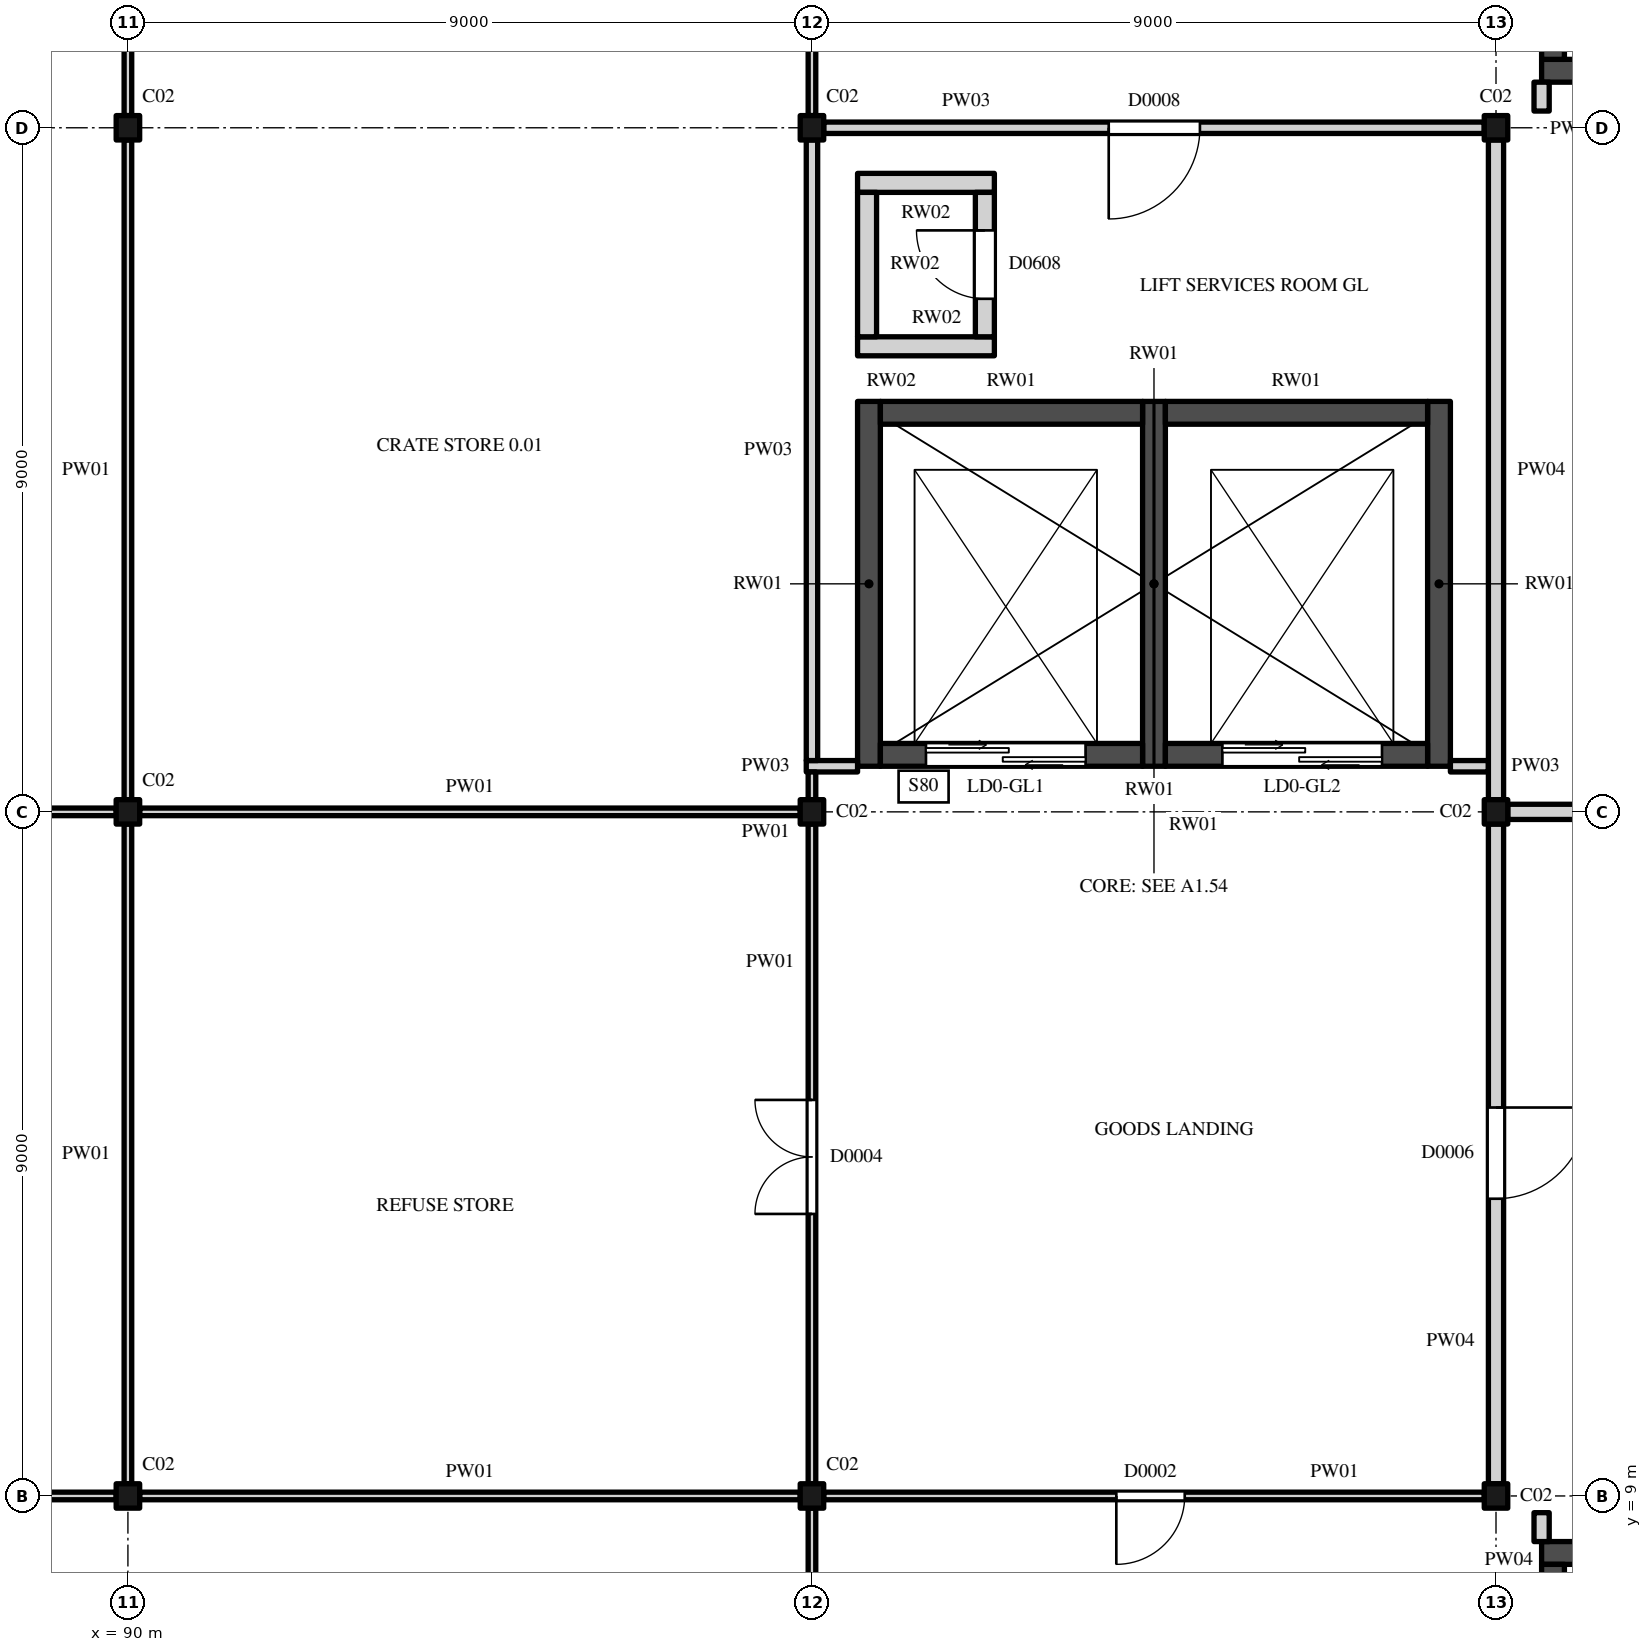
"""IFC4 building model, lengths in metres.
Left out: names, types, materials, properties, quantities, classifications, styles, units other than length and angle.
Written with IfcOpenShell. Run it as: python <this file> out.ifc"""

import sys

from ifc_helpers import new_model, si_unit, direction, frame, frame_2d, origin, origin_2d, place, context, subcontext, project, spatial, rectangle, i_section, extrude, element, fill, save


model = new_model("IFC4")
c1 = context("Model", 3, precision=1e-05, world=origin(), true_north=direction((0.0, 1.0)))
c2 = subcontext(c1, "Body", "Model", "MODEL_VIEW")
j1 = project(units=[si_unit("LENGTHUNIT", "METRE"), si_unit("PLANEANGLEUNIT", "RADIAN")], contexts=[c1])
p1 = place(None, origin())
s1 = spatial("IfcSite", under=j1, at=p1, CompositionType="ELEMENT")
p2 = place(p1, origin())
s2 = spatial("IfcBuilding", under=s1, at=p2, CompositionType="ELEMENT")
p3 = place(p2, origin())
s3 = spatial("IfcBuildingStorey", under=s2, at=p3, CompositionType="ELEMENT", Elevation=0.0)
for number, where, z_axis, x_axis in (
    (1, (90.0, 9.0, 0.0), (0.0, 0.0, 1.0), (1.0, 0.0, 0.0)),
    (2, (99.0, 9.0, 0.0), (0.0, 0.0, 1.0), (1.0, 0.0, 0.0)),
    (3, (108.0, 9.0, 0.0), (0.0, 0.0, 1.0), (1.0, 0.0, 0.0)),
    (4, (90.0, 18.0, 0.0), (0.0, 0.0, 1.0), (1.0, 0.0, 0.0)),
    (5, (99.0, 18.0, 0.0), (0.0, 0.0, 1.0), (1.0, 0.0, 0.0)),
    (6, (108.0, 18.0, 0.0), (0.0, 0.0, 1.0), (1.0, 0.0, 0.0)),
    (7, (90.0, 27.0, 0.0), (0.0, 0.0, 1.0), (1.0, 0.0, 0.0)),
    (8, (99.0, 27.0, 0.0), (0.0, 0.0, 1.0), (1.0, 0.0, 0.0)),
    (9, (108.0, 27.0, 0.0), (0.0, 0.0, 1.0), (1.0, 0.0, 0.0)),
):
    element("IfcColumn", number, at=place(p3, frame(where, z_axis=z_axis, x_axis=x_axis)), inside=s3, PredefinedType="COLUMN", context=c2, shape_type="SweptSolid", body=[
        extrude(i_section(OverallWidth=0.309, OverallDepth=0.321, WebThickness=0.014, FlangeThickness=0.022, FilletRadius=0.017, at=origin_2d()), origin(), (0.0, 0.0, 1.0), 6.0),
    ])
p4 = place(p3, frame((108.6, 8.25, 0.0), z_axis=(0.0, 0.0, 1.0), x_axis=(1.0, 0.0, 0.0)))
e10 = element("IfcWall", 10, at=p4, inside=s3, PredefinedType="SHEAR", context=c2, shape_type="SweptSolid", body=[
    extrude(rectangle(XDim=8.1, YDim=0.3, at=frame_2d((4.05, 0.0))), origin(), (0.0, 0.0, 1.0), 6.0),
])
p5 = place(p3, frame((108.75, 0.3, 0.0), z_axis=(0.0, 0.0, 1.0), x_axis=(0.0, 1.0, 0.0)))
e11 = element("IfcWall", 11, at=p5, inside=s3, PredefinedType="SHEAR", context=c2, shape_type="SweptSolid", body=[
    extrude(rectangle(XDim=7.8, YDim=0.3, at=frame_2d((3.9, 0.0))), origin(), (0.0, 0.0, 1.0), 6.0),
])
p6 = place(p5, frame((3.6, 0.0, 0.0)))
e12 = element("IfcOpeningElement", 12, at=p6, cuts=e11, PredefinedType="OPENING", context=c2, shape_type="SweptSolid", body=[
    extrude(rectangle(XDim=1.2, YDim=2.1, at=frame_2d((0.6, 1.05))), frame((0.0, 0.16, 0.0), z_axis=(0.0, -1.0, 0.0), x_axis=(1.0, 0.0, 0.0)), (0.0, 0.0, 1.0), 0.32),
])
p7 = place(p3, frame((108.6, 27.75, 0.0), z_axis=(0.0, 0.0, 1.0), x_axis=(1.0, 0.0, 0.0)))
e13 = element("IfcWall", 13, at=p7, inside=s3, PredefinedType="SHEAR", context=c2, shape_type="SweptSolid", body=[
    extrude(rectangle(XDim=8.1, YDim=0.3, at=frame_2d((4.05, 0.0))), origin(), (0.0, 0.0, 1.0), 6.0),
])
p8 = place(p3, frame((108.75, 27.9, 0.0), z_axis=(0.0, 0.0, 1.0), x_axis=(0.0, 1.0, 0.0)))
e14 = element("IfcWall", 14, at=p8, inside=s3, PredefinedType="SHEAR", context=c2, shape_type="SweptSolid", body=[
    extrude(rectangle(XDim=7.2, YDim=0.3, at=frame_2d((3.6, 0.0))), origin(), (0.0, 0.0, 1.0), 6.0),
])
p9 = place(p8, frame((3.0, 0.0, 0.0)))
e15 = element("IfcOpeningElement", 15, at=p9, cuts=e14, PredefinedType="OPENING", context=c2, shape_type="SweptSolid", body=[
    extrude(rectangle(XDim=1.2, YDim=2.1, at=frame_2d((0.6, 1.05))), frame((0.0, 0.16, 0.0), z_axis=(0.0, -1.0, 0.0), x_axis=(1.0, 0.0, 0.0)), (0.0, 0.0, 1.0), 0.32),
])
for number, where, z_axis, x_axis in (
    (16, (99.75, 18.6, -1.5), (0.0, 0.0, 1.0), (0.0, 1.0, 0.0)),
    (17, (103.5, 18.6, -1.5), (0.0, 0.0, 1.0), (0.0, 1.0, 0.0)),
    (18, (107.25, 18.6, -1.5), (0.0, 0.0, 1.0), (0.0, 1.0, 0.0)),
):
    element("IfcWall", number, at=place(p3, frame(where, z_axis=z_axis, x_axis=x_axis)), inside=s3, PredefinedType="SHEAR", context=c2, shape_type="SweptSolid", body=[
        extrude(rectangle(XDim=4.8, YDim=0.3, at=frame_2d((2.4, 0.0))), origin(), (0.0, 0.0, 1.0), 7.5),
    ])
p10 = place(p3, frame((99.9, 18.75, -1.5), z_axis=(0.0, 0.0, 1.0), x_axis=(1.0, 0.0, 0.0)))
e19 = element("IfcWall", 19, at=p10, inside=s3, PredefinedType="SHEAR", context=c2, shape_type="SweptSolid", body=[
    extrude(rectangle(XDim=3.45, YDim=0.3, at=frame_2d((1.725, 0.0))), origin(), (0.0, 0.0, 1.0), 7.5),
])
p11 = place(p10, frame((0.6, 0.0, 1.5)))
e20 = element("IfcOpeningElement", 20, at=p11, cuts=e19, PredefinedType="OPENING", context=c2, shape_type="SweptSolid", body=[
    extrude(rectangle(XDim=2.1, YDim=2.4, at=frame_2d((1.05, 1.2))), frame((0.0, 0.16, 0.0), z_axis=(0.0, -1.0, 0.0), x_axis=(1.0, 0.0, 0.0)), (0.0, 0.0, 1.0), 0.32),
])
p12 = place(p3, frame((99.9, 23.25, -1.5), z_axis=(0.0, 0.0, 1.0), x_axis=(1.0, 0.0, 0.0)))
e21 = element("IfcWall", 21, at=p12, inside=s3, PredefinedType="SHEAR", context=c2, shape_type="SweptSolid", body=[
    extrude(rectangle(XDim=3.45, YDim=0.3, at=frame_2d((1.725, 0.0))), origin(), (0.0, 0.0, 1.0), 7.5),
])
p13 = place(p3, frame((103.65, 18.75, -1.5), z_axis=(0.0, 0.0, 1.0), x_axis=(1.0, 0.0, 0.0)))
e22 = element("IfcWall", 22, at=p13, inside=s3, PredefinedType="SHEAR", context=c2, shape_type="SweptSolid", body=[
    extrude(rectangle(XDim=3.45, YDim=0.3, at=frame_2d((1.725, 0.0))), origin(), (0.0, 0.0, 1.0), 7.5),
])
p14 = place(p13, frame((0.75, 0.0, 1.5)))
e23 = element("IfcOpeningElement", 23, at=p14, cuts=e22, PredefinedType="OPENING", context=c2, shape_type="SweptSolid", body=[
    extrude(rectangle(XDim=2.1, YDim=2.4, at=frame_2d((1.05, 1.2))), frame((0.0, 0.16, 0.0), z_axis=(0.0, -1.0, 0.0), x_axis=(1.0, 0.0, 0.0)), (0.0, 0.0, 1.0), 0.32),
])
p15 = place(p3, frame((103.65, 23.25, -1.5), z_axis=(0.0, 0.0, 1.0), x_axis=(1.0, 0.0, 0.0)))
e24 = element("IfcWall", 24, at=p15, inside=s3, PredefinedType="SHEAR", context=c2, shape_type="SweptSolid", body=[
    extrude(rectangle(XDim=3.45, YDim=0.3, at=frame_2d((1.725, 0.0))), origin(), (0.0, 0.0, 1.0), 7.5),
])
for number, where, z_axis, x_axis in (
    (25, (99.6, 24.125, 0.0), (0.0, 0.0, 1.0), (1.0, 0.0, 0.0)),
    (26, (99.6, 26.275, 0.0), (0.0, 0.0, 1.0), (1.0, 0.0, 0.0)),
):
    element("IfcWall", number, at=place(p3, frame(where, z_axis=z_axis, x_axis=x_axis)), inside=s3, PredefinedType="STANDARD", context=c2, shape_type="SweptSolid", body=[
        extrude(rectangle(XDim=1.8, YDim=0.25, at=frame_2d((0.9, 0.0))), origin(), (0.0, 0.0, 1.0), 6.0),
    ])
p16 = place(p3, frame((99.725, 24.25, 0.0), z_axis=(0.0, 0.0, 1.0), x_axis=(0.0, 1.0, 0.0)))
e27 = element("IfcWall", 27, at=p16, inside=s3, PredefinedType="STANDARD", context=c2, shape_type="SweptSolid", body=[
    extrude(rectangle(XDim=1.9, YDim=0.25, at=frame_2d((0.95, 0.0))), origin(), (0.0, 0.0, 1.0), 6.0),
])
p17 = place(p3, frame((101.275, 24.25, 0.0), z_axis=(0.0, 0.0, 1.0), x_axis=(0.0, 1.0, 0.0)))
e28 = element("IfcWall", 28, at=p17, inside=s3, PredefinedType="STANDARD", context=c2, shape_type="SweptSolid", body=[
    extrude(rectangle(XDim=1.9, YDim=0.25, at=frame_2d((0.95, 0.0))), origin(), (0.0, 0.0, 1.0), 6.0),
])
p18 = place(p17, frame((0.5, 0.0, 0.0)))
e29 = element("IfcOpeningElement", 29, at=p18, cuts=e28, PredefinedType="OPENING", context=c2, shape_type="SweptSolid", body=[
    extrude(rectangle(XDim=0.9, YDim=2.1, at=frame_2d((0.45, 1.05))), frame((0.0, 0.135, 0.0), z_axis=(0.0, -1.0, 0.0), x_axis=(1.0, 0.0, 0.0)), (0.0, 0.0, 1.0), 0.27),
])
for number, where, z_axis, x_axis in (
    (30, (81.155, 9.0, 0.0), (0.0, 0.0, 1.0), (1.0, 0.0, 0.0)),
    (31, (90.155, 9.0, 0.0), (0.0, 0.0, 1.0), (1.0, 0.0, 0.0)),
):
    element("IfcWall", number, at=place(p3, frame(where, z_axis=z_axis, x_axis=x_axis)), inside=s3, PredefinedType="PARTITIONING", context=c2, shape_type="SweptSolid", body=[
        extrude(rectangle(XDim=8.691, YDim=0.1, at=frame_2d((4.345, 0.0))), origin(), (0.0, 0.0, 1.0), 5.419),
    ])
p19 = place(p3, frame((99.155, 9.0, 0.0), z_axis=(0.0, 0.0, 1.0), x_axis=(1.0, 0.0, 0.0)))
e32 = element("IfcWall", 32, at=p19, inside=s3, PredefinedType="PARTITIONING", context=c2, shape_type="SweptSolid", body=[
    extrude(rectangle(XDim=8.691, YDim=0.1, at=frame_2d((4.345, 0.0))), origin(), (0.0, 0.0, 1.0), 5.419),
])
p20 = place(p19, frame((3.85, 0.0, 0.0)))
e33 = element("IfcOpeningElement", 33, at=p20, cuts=e32, PredefinedType="OPENING", context=c2, shape_type="SweptSolid", body=[
    extrude(rectangle(XDim=0.9, YDim=2.1, at=frame_2d((0.45, 1.05))), frame((0.0, 0.06, 0.0), z_axis=(0.0, -1.0, 0.0), x_axis=(1.0, 0.0, 0.0)), (0.0, 0.0, 1.0), 0.12),
])
for number, where, z_axis, x_axis in (
    (34, (81.155, 18.0, 0.0), (0.0, 0.0, 1.0), (1.0, 0.0, 0.0)),
    (35, (90.155, 18.0, 0.0), (0.0, 0.0, 1.0), (1.0, 0.0, 0.0)),
):
    element("IfcWall", number, at=place(p3, frame(where, z_axis=z_axis, x_axis=x_axis)), inside=s3, PredefinedType="PARTITIONING", context=c2, shape_type="SweptSolid", body=[
        extrude(rectangle(XDim=8.691, YDim=0.1, at=frame_2d((4.345, 0.0))), origin(), (0.0, 0.0, 1.0), 5.419),
    ])
p21 = place(p3, frame((108.155, 18.0, 0.0), z_axis=(0.0, 0.0, 1.0), x_axis=(1.0, 0.0, 0.0)))
e36 = element("IfcWall", 36, at=p21, inside=s3, PredefinedType="PARTITIONING", context=c2, shape_type="SweptSolid", body=[
    extrude(rectangle(XDim=8.545, YDim=0.2, at=frame_2d((4.273, 0.0))), origin(), (0.0, 0.0, 1.0), 5.419),
])
p22 = place(p21, frame((3.75, 0.0, 0.0)))
e37 = element("IfcOpeningElement", 37, at=p22, cuts=e36, PredefinedType="OPENING", context=c2, shape_type="SweptSolid", body=[
    extrude(rectangle(XDim=1.0, YDim=2.1, at=frame_2d((0.5, 1.05))), frame((0.0, 0.11, 0.0), z_axis=(0.0, -1.0, 0.0), x_axis=(1.0, 0.0, 0.0)), (0.0, 0.0, 1.0), 0.22),
])
p23 = place(p3, frame((98.925, 18.6, 0.0), z_axis=(0.0, 0.0, 1.0), x_axis=(1.0, 0.0, 0.0)))
e38 = element("IfcWall", 38, at=p23, inside=s3, PredefinedType="PARTITIONING", context=c2, shape_type="SweptSolid", body=[
    extrude(rectangle(XDim=0.675, YDim=0.15, at=frame_2d((0.337, 0.0))), origin(), (0.0, 0.0, 1.0), 5.825),
])
p24 = place(p3, frame((107.4, 18.6, 0.0), z_axis=(0.0, 0.0, 1.0), x_axis=(1.0, 0.0, 0.0)))
e39 = element("IfcWall", 39, at=p24, inside=s3, PredefinedType="PARTITIONING", context=c2, shape_type="SweptSolid", body=[
    extrude(rectangle(XDim=0.5, YDim=0.15, at=frame_2d((0.25, 0.0))), origin(), (0.0, 0.0, 1.0), 5.825),
])
p25 = place(p3, frame((99.155, 27.0, 0.0), z_axis=(0.0, 0.0, 1.0), x_axis=(1.0, 0.0, 0.0)))
e40 = element("IfcWall", 40, at=p25, inside=s3, PredefinedType="PARTITIONING", context=c2, shape_type="SweptSolid", body=[
    extrude(rectangle(XDim=8.691, YDim=0.15, at=frame_2d((4.345, 0.0))), origin(), (0.0, 0.0, 1.0), 5.419),
])
p26 = place(p25, frame((3.75, 0.0, 0.0)))
e41 = element("IfcOpeningElement", 41, at=p26, cuts=e40, PredefinedType="OPENING", context=c2, shape_type="SweptSolid", body=[
    extrude(rectangle(XDim=1.2, YDim=2.4, at=frame_2d((0.6, 1.2))), frame((0.0, 0.085, 0.0), z_axis=(0.0, -1.0, 0.0), x_axis=(1.0, 0.0, 0.0)), (0.0, 0.0, 1.0), 0.17),
])
for number, where, z_axis, x_axis in (
    (42, (90.0, 9.16, 0.0), (0.0, 0.0, 1.0), (0.0, 1.0, 0.0)),
    (43, (90.0, 18.16, 0.0), (0.0, 0.0, 1.0), (0.0, 1.0, 0.0)),
):
    element("IfcWall", number, at=place(p3, frame(where, z_axis=z_axis, x_axis=x_axis)), inside=s3, PredefinedType="PARTITIONING", context=c2, shape_type="SweptSolid", body=[
        extrude(rectangle(XDim=8.679, YDim=0.1, at=frame_2d((4.34, 0.0))), origin(), (0.0, 0.0, 1.0), 5.292),
    ])
p27 = place(p3, frame((90.0, 27.16, 0.0), z_axis=(0.0, 0.0, 1.0), x_axis=(0.0, 1.0, 0.0)))
e44 = element("IfcWall", 44, at=p27, inside=s3, PredefinedType="PARTITIONING", context=c2, shape_type="SweptSolid", body=[
    extrude(rectangle(XDim=2.79, YDim=0.1, at=frame_2d((1.395, 0.0))), origin(), (0.0, 0.0, 1.0), 5.292),
])
p28 = place(p3, frame((99.0, 0.325, 0.0), z_axis=(0.0, 0.0, 1.0), x_axis=(0.0, 1.0, 0.0)))
e45 = element("IfcWall", 45, at=p28, inside=s3, PredefinedType="PARTITIONING", context=c2, shape_type="SweptSolid", body=[
    extrude(rectangle(XDim=8.515, YDim=0.1, at=frame_2d((4.257, 0.0))), origin(), (0.0, 0.0, 1.0), 5.292),
])
p29 = place(p3, frame((99.0, 9.16, 0.0), z_axis=(0.0, 0.0, 1.0), x_axis=(0.0, 1.0, 0.0)))
e46 = element("IfcWall", 46, at=p29, inside=s3, PredefinedType="PARTITIONING", context=c2, shape_type="SweptSolid", body=[
    extrude(rectangle(XDim=8.679, YDim=0.1, at=frame_2d((4.34, 0.0))), origin(), (0.0, 0.0, 1.0), 5.292),
])
p30 = place(p29, frame((3.55, 0.0, 0.0)))
e47 = element("IfcOpeningElement", 47, at=p30, cuts=e46, PredefinedType="OPENING", context=c2, shape_type="SweptSolid", body=[
    extrude(rectangle(XDim=1.5, YDim=2.1, at=frame_2d((0.75, 1.05))), frame((0.0, 0.06, 0.0), z_axis=(0.0, -1.0, 0.0), x_axis=(1.0, 0.0, 0.0)), (0.0, 0.0, 1.0), 0.12),
])
p31 = place(p3, frame((99.0, 18.16, 0.0), z_axis=(0.0, 0.0, 1.0), x_axis=(0.0, 1.0, 0.0)))
e48 = element("IfcWall", 48, at=p31, inside=s3, PredefinedType="PARTITIONING", context=c2, shape_type="SweptSolid", body=[
    extrude(rectangle(XDim=0.365, YDim=0.1, at=frame_2d((0.182, 0.0))), origin(), (0.0, 0.0, 1.0), 5.825),
])
p32 = place(p3, frame((99.0, 18.675, 0.0), z_axis=(0.0, 0.0, 1.0), x_axis=(0.0, 1.0, 0.0)))
e49 = element("IfcWall", 49, at=p32, inside=s3, PredefinedType="PARTITIONING", context=c2, shape_type="SweptSolid", body=[
    extrude(rectangle(XDim=8.165, YDim=0.15, at=frame_2d((4.082, 0.0))), origin(), (0.0, 0.0, 1.0), 5.292),
])
p33 = place(p3, frame((99.0, 27.16, 0.0), z_axis=(0.0, 0.0, 1.0), x_axis=(0.0, 1.0, 0.0)))
e50 = element("IfcWall", 50, at=p33, inside=s3, PredefinedType="PARTITIONING", context=c2, shape_type="SweptSolid", body=[
    extrude(rectangle(XDim=2.79, YDim=0.1, at=frame_2d((1.395, 0.0))), origin(), (0.0, 0.0, 1.0), 5.292),
])
p34 = place(p3, frame((108.0, 9.16, 0.0), z_axis=(0.0, 0.0, 1.0), x_axis=(0.0, 1.0, 0.0)))
e51 = element("IfcWall", 51, at=p34, inside=s3, PredefinedType="PARTITIONING", context=c2, shape_type="SweptSolid", body=[
    extrude(rectangle(XDim=8.679, YDim=0.2, at=frame_2d((4.34, 0.0))), origin(), (0.0, 0.0, 1.0), 5.292),
])
p35 = place(p34, frame((3.75, 0.0, 0.0)))
e52 = element("IfcOpeningElement", 52, at=p35, cuts=e51, PredefinedType="OPENING", context=c2, shape_type="SweptSolid", body=[
    extrude(rectangle(XDim=1.2, YDim=2.4, at=frame_2d((0.6, 1.2))), frame((0.0, 0.11, 0.0), z_axis=(0.0, -1.0, 0.0), x_axis=(1.0, 0.0, 0.0)), (0.0, 0.0, 1.0), 0.22),
])
p36 = place(p3, frame((108.0, 18.16, 0.0), z_axis=(0.0, 0.0, 1.0), x_axis=(0.0, 1.0, 0.0)))
e53 = element("IfcWall", 53, at=p36, inside=s3, PredefinedType="PARTITIONING", context=c2, shape_type="SweptSolid", body=[
    extrude(rectangle(XDim=8.679, YDim=0.2, at=frame_2d((4.34, 0.0))), origin(), (0.0, 0.0, 1.0), 5.292),
])
for number, where, z_axis, x_axis in (
    (54, (108.6, 8.4, 0.0), (0.0, 0.0, 1.0), (0.0, 1.0, 0.0)),
    (55, (108.6, 27.22, 0.0), (0.0, 0.0, 1.0), (0.0, 1.0, 0.0)),
):
    element("IfcWall", number, at=place(p3, frame(where, z_axis=z_axis, x_axis=x_axis)), inside=s3, PredefinedType="PARTITIONING", context=c2, shape_type="SweptSolid", body=[
        extrude(rectangle(XDim=0.38, YDim=0.2, at=frame_2d((0.19, 0.0))), origin(), (0.0, 0.0, 1.0), 5.825),
    ])
p37 = place(p11, origin())
e56 = element("IfcDoor", 56, at=p37, inside=s3, OperationType="DOUBLE_DOOR_SLIDING", PredefinedType="DOOR", context=c2, shape_type="SweptSolid", body=[
    extrude(rectangle(XDim=2.1, YDim=2.4, at=frame_2d((1.05, 1.2))), frame((0.0, 0.025, 0.0), z_axis=(0.0, -1.0, 0.0), x_axis=(1.0, 0.0, 0.0)), (0.0, 0.0, 1.0), 0.05),
])
fill(e20, e56)
p38 = place(p14, origin())
e57 = element("IfcDoor", 57, at=p38, inside=s3, OperationType="DOUBLE_DOOR_SLIDING", PredefinedType="DOOR", context=c2, shape_type="SweptSolid", body=[
    extrude(rectangle(XDim=2.1, YDim=2.4, at=frame_2d((1.05, 1.2))), frame((0.0, 0.025, 0.0), z_axis=(0.0, -1.0, 0.0), x_axis=(1.0, 0.0, 0.0)), (0.0, 0.0, 1.0), 0.05),
])
fill(e23, e57)
p39 = place(p18, origin())
e58 = element("IfcDoor", 58, at=p39, inside=s3, OperationType="SINGLE_SWING_LEFT", PredefinedType="DOOR", context=c2, shape_type="SweptSolid", body=[
    extrude(rectangle(XDim=0.9, YDim=2.1, at=frame_2d((0.45, 1.05))), frame((0.0, 0.025, 0.0), z_axis=(0.0, -1.0, 0.0), x_axis=(1.0, 0.0, 0.0)), (0.0, 0.0, 1.0), 0.05),
])
fill(e29, e58)
p40 = place(p20, origin())
e59 = element("IfcDoor", 59, at=p40, inside=s3, OperationType="SINGLE_SWING_LEFT", PredefinedType="DOOR", context=c2, shape_type="SweptSolid", body=[
    extrude(rectangle(XDim=0.9, YDim=2.1, at=frame_2d((0.45, 1.05))), frame((0.0, 0.025, 0.0), z_axis=(0.0, -1.0, 0.0), x_axis=(1.0, 0.0, 0.0)), (0.0, 0.0, 1.0), 0.05),
])
fill(e33, e59)
p41 = place(p30, origin())
e60 = element("IfcDoor", 60, at=p41, inside=s3, OperationType="DOUBLE_DOOR_SINGLE_SWING", PredefinedType="DOOR", context=c2, shape_type="SweptSolid", body=[
    extrude(rectangle(XDim=1.5, YDim=2.1, at=frame_2d((0.75, 1.05))), frame((0.0, 0.025, 0.0), z_axis=(0.0, -1.0, 0.0), x_axis=(1.0, 0.0, 0.0)), (0.0, 0.0, 1.0), 0.05),
])
fill(e47, e60)
p42 = place(p35, origin())
e61 = element("IfcDoor", 61, at=p42, inside=s3, OperationType="SINGLE_SWING_RIGHT", PredefinedType="DOOR", context=c2, shape_type="SweptSolid", body=[
    extrude(rectangle(XDim=1.2, YDim=2.4, at=frame_2d((0.6, 1.2))), frame((0.0, 0.025, 0.0), z_axis=(0.0, -1.0, 0.0), x_axis=(1.0, 0.0, 0.0)), (0.0, 0.0, 1.0), 0.05),
])
fill(e52, e61)
p43 = place(p26, origin())
e62 = element("IfcDoor", 62, at=p43, inside=s3, OperationType="SINGLE_SWING_LEFT", PredefinedType="DOOR", context=c2, shape_type="SweptSolid", body=[
    extrude(rectangle(XDim=1.2, YDim=2.4, at=frame_2d((0.6, 1.2))), frame((0.0, 0.025, 0.0), z_axis=(0.0, -1.0, 0.0), x_axis=(1.0, 0.0, 0.0)), (0.0, 0.0, 1.0), 0.05),
])
fill(e41, e62)
save(model, sys.argv[1])
